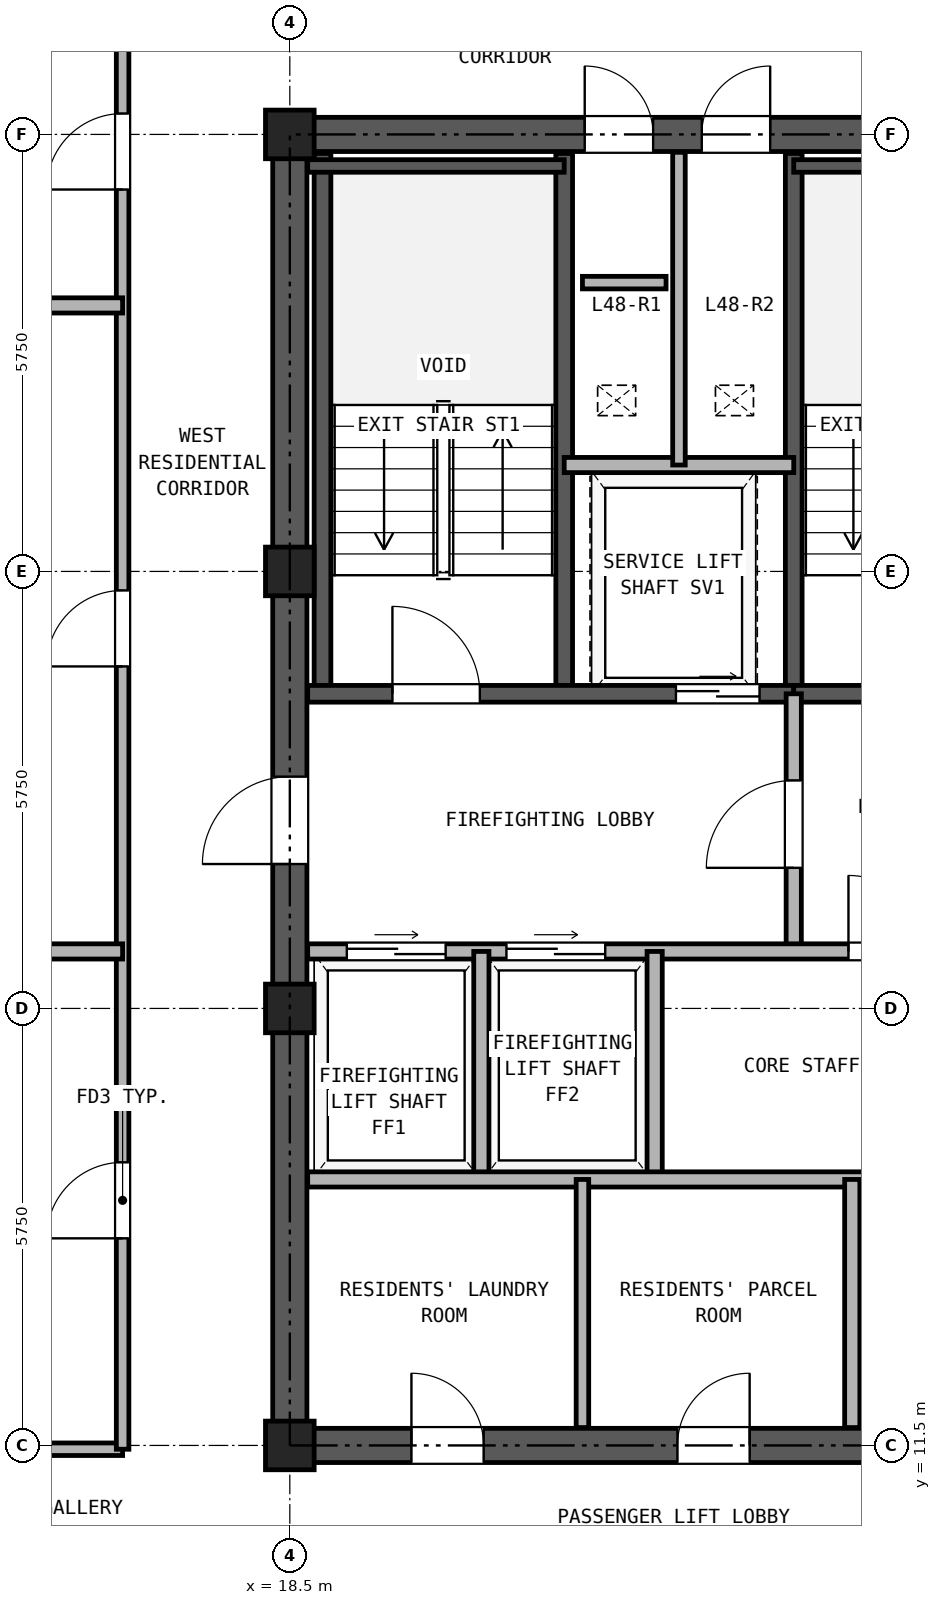
"""IFC4 building model, lengths in metres.
Left out: names, types, materials, properties, quantities, classifications, styles, units other than length and angle.
Written with IfcOpenShell. Run it as: python <this file> out.ifc"""

import sys

from ifc_helpers import new_model, si_unit, direction, frame, frame_2d, origin, origin_2d, place, context, subcontext, project, spatial, rectangle, hollow_rectangle, extrude, source, transform, mapped, element, fill, save


model = new_model("IFC4")
c1 = context("Model", 3, precision=1e-05, world=origin(), true_north=direction((0.0, 1.0)))
c2 = subcontext(c1, "Body", "Model", "MODEL_VIEW")
j1 = project(units=[si_unit("LENGTHUNIT", "METRE"), si_unit("PLANEANGLEUNIT", "RADIAN")], contexts=[c1])
p1 = place(None, origin())
s1 = spatial("IfcSite", under=j1, at=p1, CompositionType="ELEMENT")
p2 = place(p1, origin())
s2 = spatial("IfcBuilding", under=s1, at=p2, CompositionType="ELEMENT")
p3 = place(p2, frame((0.0, 0.0, 172.1)))
s3 = spatial("IfcBuildingStorey", under=s2, at=p3, CompositionType="ELEMENT", Elevation=172.1)
m1 = source(origin(), c2, "Body", "SweptSolid", [
    extrude(hollow_rectangle(XDim=0.64, YDim=0.64, WallThickness=0.035, at=origin_2d()), origin(), (0.0, 0.0, 1.0), 2.95),
])
for number, where, z_axis, x_axis in (
    (1, (18.5, 11.5, 0.0), (0.0, 0.0, 1.0), (1.0, 0.0, 0.0)),
    (2, (18.5, 17.25, 0.0), (0.0, 0.0, 1.0), (1.0, 0.0, 0.0)),
    (3, (18.5, 23.0, 0.0), (0.0, 0.0, 1.0), (1.0, 0.0, 0.0)),
    (4, (18.5, 28.75, 0.0), (0.0, 0.0, 1.0), (1.0, 0.0, 0.0)),
):
    element("IfcColumn", number, at=place(p3, frame(where, z_axis=z_axis, x_axis=x_axis)), inside=s3, PredefinedType="COLUMN", context=c2, shape_type="MappedRepresentation", body=[
        mapped(m1, transform((0.0, 0.0, 0.0), x_axis=(1.0, 0.0, 0.0), y_axis=(0.0, 1.0, 0.0), z_axis=(0.0, 0.0, 1.0), scale=1.0)),
    ])
p4 = place(p3, frame((18.275, 11.5, 0.0), z_axis=(0.0, 0.0, 1.0), x_axis=(1.0, 0.0, 0.0)))
e5 = element("IfcWall", 5, at=p4, inside=s3, PredefinedType="SHEAR", context=c2, shape_type="SweptSolid", body=[
    extrude(rectangle(XDim=10.45, YDim=0.45, at=frame_2d((5.225, 0.0))), origin(), (0.0, 0.0, 1.0), 2.95),
])
p5 = place(p4, frame((1.825, 0.0, 0.0)))
e6 = element("IfcOpeningElement", 6, at=p5, cuts=e5, PredefinedType="OPENING", context=c2, shape_type="SweptSolid", body=[
    extrude(rectangle(XDim=0.95, YDim=2.15, at=frame_2d((0.475, 1.075))), frame((0.0, 0.235, 0.0), z_axis=(0.0, -1.0, 0.0), x_axis=(1.0, 0.0, 0.0)), (0.0, 0.0, 1.0), 0.47),
])
p6 = place(p4, frame((5.325, 0.0, 0.0)))
e7 = element("IfcOpeningElement", 7, at=p6, cuts=e5, PredefinedType="OPENING", context=c2, shape_type="SweptSolid", body=[
    extrude(rectangle(XDim=0.95, YDim=2.15, at=frame_2d((0.475, 1.075))), frame((0.0, 0.235, 0.0), z_axis=(0.0, -1.0, 0.0), x_axis=(1.0, 0.0, 0.0)), (0.0, 0.0, 1.0), 0.47),
])
p7 = place(p4, frame((8.225, 0.0, 0.0)))
e8 = element("IfcOpeningElement", 8, at=p7, cuts=e5, PredefinedType="OPENING", context=c2, shape_type="SweptSolid", body=[
    extrude(rectangle(XDim=1.1, YDim=2.25, at=frame_2d((0.55, 1.125))), frame((0.0, 0.235, 0.0), z_axis=(0.0, -1.0, 0.0), x_axis=(1.0, 0.0, 0.0)), (0.0, 0.0, 1.0), 0.47),
])
p8 = place(p3, frame((18.275, 28.75, 0.0), z_axis=(0.0, 0.0, 1.0), x_axis=(1.0, 0.0, 0.0)))
e9 = element("IfcWall", 9, at=p8, inside=s3, PredefinedType="SHEAR", context=c2, shape_type="SweptSolid", body=[
    extrude(rectangle(XDim=10.45, YDim=0.45, at=frame_2d((5.225, 0.0))), origin(), (0.0, 0.0, 1.0), 2.95),
])
p9 = place(p8, frame((4.105, 0.0, 0.0)))
e10 = element("IfcOpeningElement", 10, at=p9, cuts=e9, PredefinedType="OPENING", context=c2, shape_type="SweptSolid", body=[
    extrude(rectangle(XDim=0.9, YDim=2.05, at=frame_2d((0.45, 1.025))), frame((0.0, 0.235, 0.0), z_axis=(0.0, -1.0, 0.0), x_axis=(1.0, 0.0, 0.0)), (0.0, 0.0, 1.0), 0.47),
])
p10 = place(p8, frame((5.645, 0.0, 0.0)))
e11 = element("IfcOpeningElement", 11, at=p10, cuts=e9, PredefinedType="OPENING", context=c2, shape_type="SweptSolid", body=[
    extrude(rectangle(XDim=0.9, YDim=2.05, at=frame_2d((0.45, 1.025))), frame((0.0, 0.235, 0.0), z_axis=(0.0, -1.0, 0.0), x_axis=(1.0, 0.0, 0.0)), (0.0, 0.0, 1.0), 0.47),
])
p11 = place(p3, frame((18.5, 11.725, 0.0), z_axis=(0.0, 0.0, 1.0), x_axis=(0.0, 1.0, 0.0)))
e12 = element("IfcWall", 12, at=p11, inside=s3, PredefinedType="SHEAR", context=c2, shape_type="SweptSolid", body=[
    extrude(rectangle(XDim=16.8, YDim=0.45, at=frame_2d((8.4, 0.0))), origin(), (0.0, 0.0, 1.0), 2.95),
])
p12 = place(p11, frame((7.425, 0.0, 0.0)))
e13 = element("IfcOpeningElement", 13, at=p12, cuts=e12, PredefinedType="OPENING", context=c2, shape_type="SweptSolid", body=[
    extrude(rectangle(XDim=1.15, YDim=2.2, at=frame_2d((0.575, 1.1))), frame((0.0, 0.235, 0.0), z_axis=(0.0, -1.0, 0.0), x_axis=(1.0, 0.0, 0.0)), (0.0, 0.0, 1.0), 0.47),
])
for number, where, z_axis, x_axis in (
    (14, (18.93, 21.39, 0.0), (0.0, 0.0, 1.0), (0.0, 1.0, 0.0)),
    (15, (22.11, 21.39, 0.0), (0.0, 0.0, 1.0), (0.0, 1.0, 0.0)),
    (16, (25.13, 21.39, 0.0), (0.0, 0.0, 1.0), (0.0, 1.0, 0.0)),
):
    element("IfcWall", number, at=place(p3, frame(where, z_axis=z_axis, x_axis=x_axis)), inside=s3, PredefinedType="SOLIDWALL", context=c2, shape_type="SweptSolid", body=[
        extrude(rectangle(XDim=7.11, YDim=0.22, at=frame_2d((3.555, 0.0))), origin(), (0.0, 0.0, 1.0), 2.95),
    ])
p13 = place(p3, frame((18.735, 28.335, 0.0), z_axis=(0.0, 0.0, 1.0), x_axis=(1.0, 0.0, 0.0)))
e17 = element("IfcWall", 17, at=p13, inside=s3, PredefinedType="PARTITIONING", context=c2, shape_type="SweptSolid", body=[
    extrude(rectangle(XDim=3.375, YDim=0.165, at=frame_2d((1.688, 0.0))), origin(), (0.0, 0.0, 1.0), 2.95),
])
p14 = place(p3, frame((25.13, 28.335, 0.0), z_axis=(0.0, 0.0, 1.0), x_axis=(1.0, 0.0, 0.0)))
e18 = element("IfcWall", 18, at=p14, inside=s3, PredefinedType="PARTITIONING", context=c2, shape_type="SweptSolid", body=[
    extrude(rectangle(XDim=3.135, YDim=0.165, at=frame_2d((1.567, 0.0))), origin(), (0.0, 0.0, 1.0), 2.95),
])
p15 = place(p3, frame((18.735, 21.39, 0.0), z_axis=(0.0, 0.0, 1.0), x_axis=(1.0, 0.0, 0.0)))
e19 = element("IfcWall", 19, at=p15, inside=s3, PredefinedType="SOLIDWALL", context=c2, shape_type="SweptSolid", body=[
    extrude(rectangle(XDim=6.395, YDim=0.22, at=frame_2d((3.197, 0.0))), origin(), (0.0, 0.0, 1.0), 2.95),
])
p16 = place(p15, frame((1.115, 0.0, 0.0)))
e20 = element("IfcOpeningElement", 20, at=p16, cuts=e19, PredefinedType="OPENING", context=c2, shape_type="SweptSolid", body=[
    extrude(rectangle(XDim=1.15, YDim=2.2, at=frame_2d((0.575, 1.1))), frame((0.0, 0.12, 0.0), z_axis=(0.0, -1.0, 0.0), x_axis=(1.0, 0.0, 0.0)), (0.0, 0.0, 1.0), 0.24),
])
p17 = place(p15, frame((4.845, 0.0, 0.0)))
e21 = element("IfcOpeningElement", 21, at=p17, cuts=e19, PredefinedType="OPENING", context=c2, shape_type="SweptSolid", body=[
    extrude(rectangle(XDim=1.1, YDim=2.25, at=frame_2d((0.55, 1.125))), frame((0.0, 0.12, 0.0), z_axis=(0.0, -1.0, 0.0), x_axis=(1.0, 0.0, 0.0)), (0.0, 0.0, 1.0), 0.24),
])
p18 = place(p3, frame((25.13, 21.39, 0.0), z_axis=(0.0, 0.0, 1.0), x_axis=(1.0, 0.0, 0.0)))
e22 = element("IfcWall", 22, at=p18, inside=s3, PredefinedType="SOLIDWALL", context=c2, shape_type="SweptSolid", body=[
    extrude(rectangle(XDim=3.135, YDim=0.22, at=frame_2d((1.567, 0.0))), origin(), (0.0, 0.0, 1.0), 2.95),
])
p19 = place(p18, frame((0.92, 0.0, 0.0)))
e23 = element("IfcOpeningElement", 23, at=p19, cuts=e22, PredefinedType="OPENING", context=c2, shape_type="SweptSolid", body=[
    extrude(rectangle(XDim=1.15, YDim=2.2, at=frame_2d((0.575, 1.1))), frame((0.0, 0.12, 0.0), z_axis=(0.0, -1.0, 0.0), x_axis=(1.0, 0.0, 0.0)), (0.0, 0.0, 1.0), 0.24),
])
p20 = place(p3, frame((22.11, 24.4, 0.0), z_axis=(0.0, 0.0, 1.0), x_axis=(1.0, 0.0, 0.0)))
e24 = element("IfcWall", 24, at=p20, inside=s3, PredefinedType="PARTITIONING", context=c2, shape_type="SweptSolid", body=[
    extrude(rectangle(XDim=3.02, YDim=0.2, at=frame_2d((1.51, 0.0))), origin(), (0.0, 0.0, 1.0), 2.95),
])
p21 = place(p3, frame((23.62, 24.4, 0.0), z_axis=(0.0, 0.0, 1.0), x_axis=(0.0, 1.0, 0.0)))
e25 = element("IfcWall", 25, at=p21, inside=s3, PredefinedType="PARTITIONING", context=c2, shape_type="SweptSolid", body=[
    extrude(rectangle(XDim=4.115, YDim=0.165, at=frame_2d((2.058, 0.0))), origin(), (0.0, 0.0, 1.0), 2.95),
])
p22 = place(p3, frame((25.13, 18.0, 0.0), z_axis=(0.0, 0.0, 1.0), x_axis=(0.0, 1.0, 0.0)))
e26 = element("IfcWall", 26, at=p22, inside=s3, PredefinedType="PARTITIONING", context=c2, shape_type="SweptSolid", body=[
    extrude(rectangle(XDim=3.39, YDim=0.2, at=frame_2d((1.695, 0.0))), origin(), (0.0, 0.0, 1.0), 2.95),
])
p23 = place(p22, frame((1.1, 0.0, 0.0)))
e27 = element("IfcOpeningElement", 27, at=p23, cuts=e26, PredefinedType="OPENING", context=c2, shape_type="SweptSolid", body=[
    extrude(rectangle(XDim=1.15, YDim=2.2, at=frame_2d((0.575, 1.1))), frame((0.0, 0.11, 0.0), z_axis=(0.0, -1.0, 0.0), x_axis=(1.0, 0.0, 0.0)), (0.0, 0.0, 1.0), 0.22),
])
p24 = place(p3, frame((18.735, 18.0, 0.0), z_axis=(0.0, 0.0, 1.0), x_axis=(1.0, 0.0, 0.0)))
e28 = element("IfcWall", 28, at=p24, inside=s3, PredefinedType="PARTITIONING", context=c2, shape_type="SweptSolid", body=[
    extrude(rectangle(XDim=9.53, YDim=0.2, at=frame_2d((4.765, 0.0))), origin(), (0.0, 0.0, 1.0), 2.95),
])
p25 = place(p24, frame((0.515, 0.0, 0.0)))
e29 = element("IfcOpeningElement", 29, at=p25, cuts=e28, PredefinedType="OPENING", context=c2, shape_type="SweptSolid", body=[
    extrude(rectangle(XDim=1.3, YDim=2.3, at=frame_2d((0.65, 1.15))), frame((0.0, 0.11, 0.0), z_axis=(0.0, -1.0, 0.0), x_axis=(1.0, 0.0, 0.0)), (0.0, 0.0, 1.0), 0.22),
])
p26 = place(p24, frame((2.615, 0.0, 0.0)))
e30 = element("IfcOpeningElement", 30, at=p26, cuts=e28, PredefinedType="OPENING", context=c2, shape_type="SweptSolid", body=[
    extrude(rectangle(XDim=1.3, YDim=2.3, at=frame_2d((0.65, 1.15))), frame((0.0, 0.11, 0.0), z_axis=(0.0, -1.0, 0.0), x_axis=(1.0, 0.0, 0.0)), (0.0, 0.0, 1.0), 0.22),
])
p27 = place(p24, frame((7.115, 0.0, 0.0)))
e31 = element("IfcOpeningElement", 31, at=p27, cuts=e28, PredefinedType="OPENING", context=c2, shape_type="SweptSolid", body=[
    extrude(rectangle(XDim=1.0, YDim=2.15, at=frame_2d((0.5, 1.075))), frame((0.0, 0.11, 0.0), z_axis=(0.0, -1.0, 0.0), x_axis=(1.0, 0.0, 0.0)), (0.0, 0.0, 1.0), 0.22),
])
for number, where, z_axis, x_axis in (
    (32, (21.02, 15.0, 0.0), (0.0, 0.0, 1.0), (0.0, 1.0, 0.0)),
    (33, (23.3, 15.0, 0.0), (0.0, 0.0, 1.0), (0.0, 1.0, 0.0)),
):
    element("IfcWall", number, at=place(p3, frame(where, z_axis=z_axis, x_axis=x_axis)), inside=s3, PredefinedType="PARTITIONING", context=c2, shape_type="SweptSolid", body=[
        extrude(rectangle(XDim=3.0, YDim=0.2, at=frame_2d((1.5, 0.0))), origin(), (0.0, 0.0, 1.0), 2.95),
    ])
p28 = place(p3, frame((18.735, 15.0, 0.0), z_axis=(0.0, 0.0, 1.0), x_axis=(1.0, 0.0, 0.0)))
e34 = element("IfcWall", 34, at=p28, inside=s3, PredefinedType="PARTITIONING", context=c2, shape_type="SweptSolid", body=[
    extrude(rectangle(XDim=9.53, YDim=0.2, at=frame_2d((4.765, 0.0))), origin(), (0.0, 0.0, 1.0), 2.95),
])
p29 = place(p3, frame((22.35, 11.735, 0.0), z_axis=(0.0, 0.0, 1.0), x_axis=(0.0, 1.0, 0.0)))
e35 = element("IfcWall", 35, at=p29, inside=s3, PredefinedType="PARTITIONING", context=c2, shape_type="SweptSolid", body=[
    extrude(rectangle(XDim=3.265, YDim=0.165, at=frame_2d((1.632, 0.0))), origin(), (0.0, 0.0, 1.0), 2.95),
])
p30 = place(p3, frame((25.9, 11.735, 0.0), z_axis=(0.0, 0.0, 1.0), x_axis=(0.0, 1.0, 0.0)))
e36 = element("IfcWall", 36, at=p30, inside=s3, PredefinedType="PARTITIONING", context=c2, shape_type="SweptSolid", body=[
    extrude(rectangle(XDim=3.265, YDim=0.2, at=frame_2d((1.632, 0.0))), origin(), (0.0, 0.0, 1.0), 2.95),
])
p31 = place(p3, frame((7.6, 11.45, 0.0), z_axis=(0.0, 0.0, 1.0), x_axis=(1.0, 0.0, 0.0)))
e37 = element("IfcWall", 37, at=p31, inside=s3, PredefinedType="PARTITIONING", context=c2, shape_type="SweptSolid", body=[
    extrude(rectangle(XDim=8.7, YDim=0.165, at=frame_2d((4.35, 0.0))), origin(), (0.0, 0.0, 1.0), 2.323),
])
p32 = place(p3, frame((16.3, 11.45, 0.0), z_axis=(0.0, 0.0, 1.0), x_axis=(0.0, 1.0, 0.0)))
e38 = element("IfcWall", 38, at=p32, inside=s3, PredefinedType="PARTITIONING", context=c2, shape_type="SweptSolid", body=[
    extrude(rectangle(XDim=23.69, YDim=0.165, at=frame_2d((11.845, 0.0))), origin(), (0.0, 0.0, 1.0), 2.95),
])
p33 = place(p32, frame((2.775, 0.0, 0.0)))
e39 = element("IfcOpeningElement", 39, at=p33, cuts=e38, PredefinedType="OPENING", context=c2, shape_type="SweptSolid", body=[
    extrude(rectangle(XDim=1.0, YDim=2.15, at=frame_2d((0.5, 1.075))), frame((0.0, 0.093, 0.0), z_axis=(0.0, -1.0, 0.0), x_axis=(1.0, 0.0, 0.0)), (0.0, 0.0, 1.0), 0.185),
])
p34 = place(p32, frame((10.3, 0.0, 0.0)))
e40 = element("IfcOpeningElement", 40, at=p34, cuts=e38, PredefinedType="OPENING", context=c2, shape_type="SweptSolid", body=[
    extrude(rectangle(XDim=1.0, YDim=2.15, at=frame_2d((0.5, 1.075))), frame((0.0, 0.093, 0.0), z_axis=(0.0, -1.0, 0.0), x_axis=(1.0, 0.0, 0.0)), (0.0, 0.0, 1.0), 0.185),
])
p35 = place(p32, frame((16.575, 0.0, 0.0)))
e41 = element("IfcOpeningElement", 41, at=p35, cuts=e38, PredefinedType="OPENING", context=c2, shape_type="SweptSolid", body=[
    extrude(rectangle(XDim=1.0, YDim=2.15, at=frame_2d((0.5, 1.075))), frame((0.0, 0.093, 0.0), z_axis=(0.0, -1.0, 0.0), x_axis=(1.0, 0.0, 0.0)), (0.0, 0.0, 1.0), 0.185),
])
for number, where, z_axis, x_axis in (
    (42, (0.16, 18.0, 0.0), (0.0, 0.0, 1.0), (1.0, 0.0, 0.0)),
    (43, (0.16, 26.5, 0.0), (0.0, 0.0, 1.0), (1.0, 0.0, 0.0)),
):
    element("IfcWall", number, at=place(p3, frame(where, z_axis=z_axis, x_axis=x_axis)), inside=s3, PredefinedType="PARTITIONING", context=c2, shape_type="SweptSolid", body=[
        extrude(rectangle(XDim=16.14, YDim=0.2, at=frame_2d((8.07, 0.0))), origin(), (0.0, 0.0, 1.0), 2.95),
    ])
p36 = place(p3, frame((22.35, 26.8, 0.0), z_axis=(0.0, 0.0, 1.0), x_axis=(1.0, 0.0, 0.0)))
e44 = element("IfcWall", 44, at=p36, inside=s3, PredefinedType="PARTITIONING", context=c2, shape_type="SweptSolid", body=[
    extrude(rectangle(XDim=1.1, YDim=0.165, at=frame_2d((0.55, 0.0))), origin(), (0.0, 0.0, 1.0), 2.95),
])
p37 = place(p16, frame((1.15, 0.0, 0.0), z_axis=(0.0, 0.0, 1.0), x_axis=(-1.0, 0.0, 0.0)))
e45 = element("IfcDoor", 45, at=p37, inside=s3, OperationType="SINGLE_SWING_LEFT", PredefinedType="DOOR", context=c2, shape_type="SweptSolid", body=[
    extrude(rectangle(XDim=1.15, YDim=2.2, at=frame_2d((0.575, 1.1))), frame((0.0, 0.025, 0.0), z_axis=(0.0, -1.0, 0.0), x_axis=(1.0, 0.0, 0.0)), (0.0, 0.0, 1.0), 0.05),
])
fill(e20, e45)
p38 = place(p17, frame((1.1, 0.0, 0.0), z_axis=(0.0, 0.0, 1.0), x_axis=(-1.0, 0.0, 0.0)))
e46 = element("IfcDoor", 46, at=p38, inside=s3, OperationType="DOUBLE_DOOR_SLIDING", PredefinedType="DOOR", context=c2, shape_type="SweptSolid", body=[
    extrude(rectangle(XDim=1.1, YDim=2.25, at=frame_2d((0.55, 1.125))), frame((0.0, 0.025, 0.0), z_axis=(0.0, -1.0, 0.0), x_axis=(1.0, 0.0, 0.0)), (0.0, 0.0, 1.0), 0.05),
])
fill(e21, e46)
p39 = place(p23, origin())
e47 = element("IfcDoor", 47, at=p39, inside=s3, OperationType="SINGLE_SWING_LEFT", PredefinedType="DOOR", context=c2, shape_type="SweptSolid", body=[
    extrude(rectangle(XDim=1.15, YDim=2.2, at=frame_2d((0.575, 1.1))), frame((0.0, 0.025, 0.0), z_axis=(0.0, -1.0, 0.0), x_axis=(1.0, 0.0, 0.0)), (0.0, 0.0, 1.0), 0.05),
])
fill(e27, e47)
p40 = place(p25, origin())
e48 = element("IfcDoor", 48, at=p40, inside=s3, OperationType="DOUBLE_DOOR_SLIDING", PredefinedType="DOOR", context=c2, shape_type="SweptSolid", body=[
    extrude(rectangle(XDim=1.3, YDim=2.3, at=frame_2d((0.65, 1.15))), frame((0.0, 0.025, 0.0), z_axis=(0.0, -1.0, 0.0), x_axis=(1.0, 0.0, 0.0)), (0.0, 0.0, 1.0), 0.05),
])
fill(e29, e48)
p41 = place(p26, origin())
e49 = element("IfcDoor", 49, at=p41, inside=s3, OperationType="DOUBLE_DOOR_SLIDING", PredefinedType="DOOR", context=c2, shape_type="SweptSolid", body=[
    extrude(rectangle(XDim=1.3, YDim=2.3, at=frame_2d((0.65, 1.15))), frame((0.0, 0.025, 0.0), z_axis=(0.0, -1.0, 0.0), x_axis=(1.0, 0.0, 0.0)), (0.0, 0.0, 1.0), 0.05),
])
fill(e30, e49)
p42 = place(p27, frame((1.0, 0.0, 0.0), z_axis=(0.0, 0.0, 1.0), x_axis=(-1.0, 0.0, 0.0)))
e50 = element("IfcDoor", 50, at=p42, inside=s3, OperationType="SINGLE_SWING_LEFT", PredefinedType="DOOR", context=c2, shape_type="SweptSolid", body=[
    extrude(rectangle(XDim=1.0, YDim=2.15, at=frame_2d((0.5, 1.075))), frame((0.0, 0.025, 0.0), z_axis=(0.0, -1.0, 0.0), x_axis=(1.0, 0.0, 0.0)), (0.0, 0.0, 1.0), 0.05),
])
fill(e31, e50)
p43 = place(p12, frame((1.15, 0.0, 0.0), z_axis=(0.0, 0.0, 1.0), x_axis=(-1.0, 0.0, 0.0)))
e51 = element("IfcDoor", 51, at=p43, inside=s3, OperationType="SINGLE_SWING_LEFT", PredefinedType="DOOR", context=c2, shape_type="SweptSolid", body=[
    extrude(rectangle(XDim=1.15, YDim=2.2, at=frame_2d((0.575, 1.1))), frame((0.0, 0.025, 0.0), z_axis=(0.0, -1.0, 0.0), x_axis=(1.0, 0.0, 0.0)), (0.0, 0.0, 1.0), 0.05),
])
fill(e13, e51)
p44 = place(p9, origin())
e52 = element("IfcDoor", 52, at=p44, inside=s3, OperationType="SINGLE_SWING_LEFT", PredefinedType="DOOR", context=c2, shape_type="SweptSolid", body=[
    extrude(rectangle(XDim=0.9, YDim=2.05, at=frame_2d((0.45, 1.025))), frame((0.0, 0.025, 0.0), z_axis=(0.0, -1.0, 0.0), x_axis=(1.0, 0.0, 0.0)), (0.0, 0.0, 1.0), 0.05),
])
fill(e10, e52)
p45 = place(p10, origin())
e53 = element("IfcDoor", 53, at=p45, inside=s3, OperationType="SINGLE_SWING_RIGHT", PredefinedType="DOOR", context=c2, shape_type="SweptSolid", body=[
    extrude(rectangle(XDim=0.9, YDim=2.05, at=frame_2d((0.45, 1.025))), frame((0.0, 0.025, 0.0), z_axis=(0.0, -1.0, 0.0), x_axis=(1.0, 0.0, 0.0)), (0.0, 0.0, 1.0), 0.05),
])
fill(e11, e53)
p46 = place(p5, frame((0.95, 0.0, 0.0), z_axis=(0.0, 0.0, 1.0), x_axis=(-1.0, 0.0, 0.0)))
e54 = element("IfcDoor", 54, at=p46, inside=s3, OperationType="SINGLE_SWING_LEFT", PredefinedType="DOOR", context=c2, shape_type="SweptSolid", body=[
    extrude(rectangle(XDim=0.95, YDim=2.15, at=frame_2d((0.475, 1.075))), frame((0.0, 0.025, 0.0), z_axis=(0.0, -1.0, 0.0), x_axis=(1.0, 0.0, 0.0)), (0.0, 0.0, 1.0), 0.05),
])
fill(e6, e54)
p47 = place(p6, frame((0.95, 0.0, 0.0), z_axis=(0.0, 0.0, 1.0), x_axis=(-1.0, 0.0, 0.0)))
e55 = element("IfcDoor", 55, at=p47, inside=s3, OperationType="SINGLE_SWING_RIGHT", PredefinedType="DOOR", context=c2, shape_type="SweptSolid", body=[
    extrude(rectangle(XDim=0.95, YDim=2.15, at=frame_2d((0.475, 1.075))), frame((0.0, 0.025, 0.0), z_axis=(0.0, -1.0, 0.0), x_axis=(1.0, 0.0, 0.0)), (0.0, 0.0, 1.0), 0.05),
])
fill(e7, e55)
p48 = place(p33, origin())
e56 = element("IfcDoor", 56, at=p48, inside=s3, OperationType="SINGLE_SWING_LEFT", PredefinedType="DOOR", context=c2, shape_type="SweptSolid", body=[
    extrude(rectangle(XDim=1.0, YDim=2.15, at=frame_2d((0.5, 1.075))), frame((0.0, 0.025, 0.0), z_axis=(0.0, -1.0, 0.0), x_axis=(1.0, 0.0, 0.0)), (0.0, 0.0, 1.0), 0.05),
])
fill(e39, e56)
p49 = place(p34, origin())
e57 = element("IfcDoor", 57, at=p49, inside=s3, OperationType="SINGLE_SWING_LEFT", PredefinedType="DOOR", context=c2, shape_type="SweptSolid", body=[
    extrude(rectangle(XDim=1.0, YDim=2.15, at=frame_2d((0.5, 1.075))), frame((0.0, 0.025, 0.0), z_axis=(0.0, -1.0, 0.0), x_axis=(1.0, 0.0, 0.0)), (0.0, 0.0, 1.0), 0.05),
])
fill(e40, e57)
p50 = place(p35, origin())
e58 = element("IfcDoor", 58, at=p50, inside=s3, OperationType="SINGLE_SWING_LEFT", PredefinedType="DOOR", context=c2, shape_type="SweptSolid", body=[
    extrude(rectangle(XDim=1.0, YDim=2.15, at=frame_2d((0.5, 1.075))), frame((0.0, 0.025, 0.0), z_axis=(0.0, -1.0, 0.0), x_axis=(1.0, 0.0, 0.0)), (0.0, 0.0, 1.0), 0.05),
])
fill(e41, e58)
save(model, sys.argv[1])
